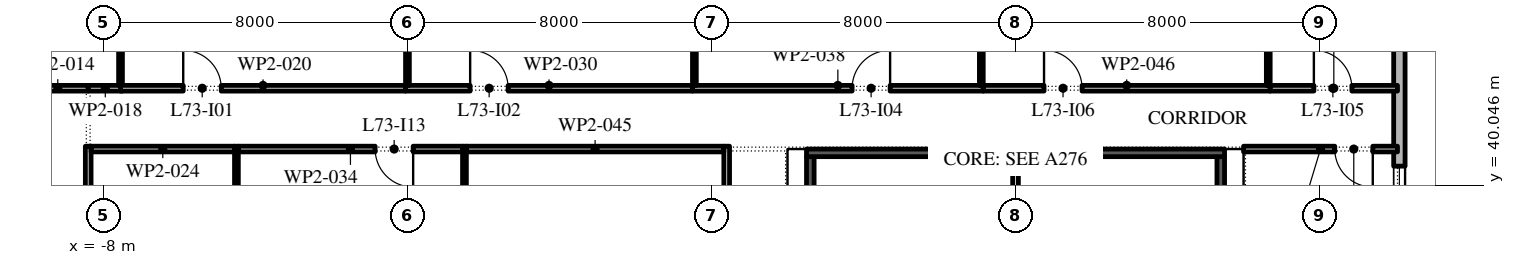
"""IFC4 building model, lengths in metres.
Left out: names, types, materials, properties, quantities, classifications, styles, units other than length and angle.
Written with IfcOpenShell. Run it as: python <this file> out.ifc"""

import sys

from ifc_helpers import new_model, si_unit, direction, frame, frame_2d, origin, place, context, subcontext, project, spatial, rectangle, extrude, element, fill, save


model = new_model("IFC4")
c1 = context("Model", 3, precision=1e-05, world=origin(), true_north=direction((0.0, 1.0)))
c2 = subcontext(c1, "Body", "Model", "MODEL_VIEW")
j1 = project(units=[si_unit("LENGTHUNIT", "METRE"), si_unit("PLANEANGLEUNIT", "RADIAN")], contexts=[c1])
p1 = place(None, origin())
s1 = spatial("IfcSite", under=j1, at=p1, CompositionType="ELEMENT")
p2 = place(p1, origin())
s2 = spatial("IfcBuilding", under=s1, at=p2, CompositionType="ELEMENT")
p3 = place(p2, frame((0.0, 0.0, 334.2)))
s3 = spatial("IfcBuildingStorey", under=s2, at=p3, CompositionType="ELEMENT", Elevation=334.2)
p4 = place(p3, frame((26.1, -2.1, 0.0), z_axis=(0.0, 0.0, 1.0), x_axis=(0.0, 1.0, 0.0)))
e1 = element("IfcWall", 1, at=p4, inside=s3, PredefinedType="STANDARD", context=c2, shape_type="SweptSolid", body=[
    extrude(rectangle(XDim=51.5, YDim=0.3, at=frame_2d((25.75, 0.0))), origin(), (0.0, 0.0, 1.0), 4.0),
])
p5 = place(p4, frame((1.3, 0.0, 0.45)))
e2 = element("IfcOpeningElement", 2, at=p5, cuts=e1, PredefinedType="OPENING", context=c2, shape_type="SweptSolid", body=[
    extrude(rectangle(XDim=4.5, YDim=3.05, at=frame_2d((2.25, 1.525))), frame((0.0, 0.16, 0.0), z_axis=(0.0, -1.0, 0.0), x_axis=(1.0, 0.0, 0.0)), (0.0, 0.0, 1.0), 0.32),
])
p6 = place(p4, frame((8.55, 0.0, 0.45)))
e3 = element("IfcOpeningElement", 3, at=p6, cuts=e1, PredefinedType="OPENING", context=c2, shape_type="SweptSolid", body=[
    extrude(rectangle(XDim=4.5, YDim=3.05, at=frame_2d((2.25, 1.525))), frame((0.0, 0.16, 0.0), z_axis=(0.0, -1.0, 0.0), x_axis=(1.0, 0.0, 0.0)), (0.0, 0.0, 1.0), 0.32),
])
p7 = place(p4, frame((17.0, 0.0, 0.0)))
e4 = element("IfcOpeningElement", 4, at=p7, cuts=e1, PredefinedType="OPENING", context=c2, shape_type="SweptSolid", body=[
    extrude(rectangle(XDim=2.4, YDim=3.5, at=frame_2d((1.2, 1.75))), frame((0.0, 0.16, 0.0), z_axis=(0.0, -1.0, 0.0), x_axis=(1.0, 0.0, 0.0)), (0.0, 0.0, 1.0), 0.32),
])
p8 = place(p4, frame((23.35, 0.0, 0.45)))
e5 = element("IfcOpeningElement", 5, at=p8, cuts=e1, PredefinedType="OPENING", context=c2, shape_type="SweptSolid", body=[
    extrude(rectangle(XDim=4.5, YDim=3.05, at=frame_2d((2.25, 1.525))), frame((0.0, 0.16, 0.0), z_axis=(0.0, -1.0, 0.0), x_axis=(1.0, 0.0, 0.0)), (0.0, 0.0, 1.0), 0.32),
])
p9 = place(p4, frame((30.75, 0.0, 0.45)))
e6 = element("IfcOpeningElement", 6, at=p9, cuts=e1, PredefinedType="OPENING", context=c2, shape_type="SweptSolid", body=[
    extrude(rectangle(XDim=4.5, YDim=3.05, at=frame_2d((2.25, 1.525))), frame((0.0, 0.16, 0.0), z_axis=(0.0, -1.0, 0.0), x_axis=(1.0, 0.0, 0.0)), (0.0, 0.0, 1.0), 0.32),
])
p10 = place(p4, frame((38.15, 0.0, 0.45)))
e7 = element("IfcOpeningElement", 7, at=p10, cuts=e1, PredefinedType="OPENING", context=c2, shape_type="SweptSolid", body=[
    extrude(rectangle(XDim=4.5, YDim=3.05, at=frame_2d((2.25, 1.525))), frame((0.0, 0.16, 0.0), z_axis=(0.0, -1.0, 0.0), x_axis=(1.0, 0.0, 0.0)), (0.0, 0.0, 1.0), 0.32),
])
p11 = place(p4, frame((46.6, 0.0, 0.0)))
e8 = element("IfcOpeningElement", 8, at=p11, cuts=e1, PredefinedType="OPENING", context=c2, shape_type="SweptSolid", body=[
    extrude(rectangle(XDim=2.4, YDim=3.5, at=frame_2d((1.2, 1.75))), frame((0.0, 0.16, 0.0), z_axis=(0.0, -1.0, 0.0), x_axis=(1.0, 0.0, 0.0)), (0.0, 0.0, 1.0), 0.32),
])
p12 = place(p3, frame((21.4, 25.75, 0.0), z_axis=(0.0, 0.0, 1.0), x_axis=(0.0, 1.0, 0.0)))
e9 = element("IfcWall", 9, at=p12, inside=s3, PredefinedType="SHEAR", context=c2, shape_type="SweptSolid", body=[
    extrude(rectangle(XDim=15.05, YDim=0.2, at=frame_2d((7.525, 0.0))), origin(), (0.0, 0.0, 1.0), 4.0),
])
p13 = place(p12, frame((7.075, 0.0, 0.0)))
e10 = element("IfcOpeningElement", 10, at=p13, cuts=e9, PredefinedType="OPENING", context=c2, shape_type="SweptSolid", body=[
    extrude(rectangle(XDim=0.9, YDim=2.1, at=frame_2d((0.45, 1.05))), frame((0.0, 0.11, 0.0), z_axis=(0.0, -1.0, 0.0), x_axis=(1.0, 0.0, 0.0)), (0.0, 0.0, 1.0), 0.22),
])
p14 = place(p3, frame((10.6, 25.75, 0.0), z_axis=(0.0, 0.0, 1.0), x_axis=(0.0, 1.0, 0.0)))
e11 = element("IfcWall", 11, at=p14, inside=s3, PredefinedType="SHEAR", context=c2, shape_type="SweptSolid", body=[
    extrude(rectangle(XDim=15.05, YDim=0.2, at=frame_2d((7.525, 0.0))), origin(), (0.0, 0.0, 1.0), 4.0),
])
p15 = place(p14, frame((7.075, 0.0, 0.0)))
e12 = element("IfcOpeningElement", 12, at=p15, cuts=e11, PredefinedType="OPENING", context=c2, shape_type="SweptSolid", body=[
    extrude(rectangle(XDim=0.9, YDim=2.1, at=frame_2d((0.45, 1.05))), frame((0.0, 0.11, 0.0), z_axis=(0.0, -1.0, 0.0), x_axis=(1.0, 0.0, 0.0)), (0.0, 0.0, 1.0), 0.22),
])
p16 = place(p3, frame((10.5, 40.9, 0.0), z_axis=(0.0, 0.0, 1.0), x_axis=(1.0, 0.0, 0.0)))
e13 = element("IfcWall", 13, at=p16, inside=s3, PredefinedType="SHEAR", context=c2, shape_type="SweptSolid", body=[
    extrude(rectangle(XDim=11.0, YDim=0.2, at=frame_2d((5.5, 0.0))), origin(), (0.0, 0.0, 1.0), 4.0),
])
p17 = place(p3, frame((16.0, 25.75, 0.0), z_axis=(0.0, 0.0, 1.0), x_axis=(0.0, 1.0, 0.0)))
e14 = element("IfcWall", 14, at=p17, inside=s3, PredefinedType="PARTITIONING", context=c2, shape_type="SweptSolid", body=[
    extrude(rectangle(XDim=15.05, YDim=0.15, at=frame_2d((7.525, 0.0))), origin(), (0.0, 0.0, 1.0), 4.0),
])
p18 = place(p3, frame((-10.0, 42.6, 0.0), z_axis=(0.0, 0.0, 1.0), x_axis=(1.0, 0.0, 0.0)))
e15 = element("IfcWall", 15, at=p18, inside=s3, PredefinedType="PARTITIONING", context=c2, shape_type="SweptSolid", body=[
    extrude(rectangle(XDim=1.6, YDim=0.15, at=frame_2d((0.8, 0.0))), origin(), (0.0, 0.0, 1.0), 4.0),
])
p19 = place(p3, frame((-8.4, 41.075, 0.0), z_axis=(0.0, 0.0, 1.0), x_axis=(0.0, -1.0, 0.0)))
e16 = element("IfcWall", 16, at=p19, inside=s3, PredefinedType="PARTITIONING", context=c2, shape_type="SweptSolid", body=[
    extrude(rectangle(XDim=9.025, YDim=0.15, at=frame_2d((4.512, 0.0))), origin(), (0.0, 0.0, 1.0), 4.0),
])
p20 = place(p19, frame((2.175, 0.0, 0.0)))
e17 = element("IfcOpeningElement", 17, at=p20, cuts=e16, PredefinedType="OPENING", context=c2, shape_type="SweptSolid", body=[
    extrude(rectangle(XDim=1.0, YDim=2.1, at=frame_2d((0.5, 1.05))), frame((0.0, 0.085, 0.0), z_axis=(0.0, -1.0, 0.0), x_axis=(1.0, 0.0, 0.0)), (0.0, 0.0, 1.0), 0.17),
])
p21 = place(p3, frame((-8.4, 42.6, 0.0), z_axis=(0.0, 0.0, 1.0), x_axis=(1.0, 0.0, 0.0)))
e18 = element("IfcWall", 18, at=p21, inside=s3, PredefinedType="PARTITIONING", context=c2, shape_type="SweptSolid", body=[
    extrude(rectangle(XDim=0.9, YDim=0.15, at=frame_2d((0.45, 0.0))), origin(), (0.0, 0.0, 1.0), 4.0),
])
p22 = place(p3, frame((-7.55, 42.675, 0.0), z_axis=(0.0, 0.0, 1.0), x_axis=(0.0, 1.0, 0.0)))
e19 = element("IfcWall", 19, at=p22, inside=s3, PredefinedType="PARTITIONING", context=c2, shape_type="SweptSolid", body=[
    extrude(rectangle(XDim=4.775, YDim=0.1, at=frame_2d((2.387, 0.0))), origin(), (0.0, 0.0, 1.0), 3.164),
])
p23 = place(p3, frame((-7.55, 42.6, 0.0), z_axis=(0.0, 0.0, 1.0), x_axis=(1.0, 0.0, 0.0)))
e20 = element("IfcWall", 20, at=p23, inside=s3, PredefinedType="PARTITIONING", context=c2, shape_type="SweptSolid", body=[
    extrude(rectangle(XDim=7.5, YDim=0.15, at=frame_2d((3.75, 0.0))), origin(), (0.0, 0.0, 1.0), 4.0),
])
p24 = place(p23, frame((1.65, 0.0, 0.0)))
e21 = element("IfcOpeningElement", 21, at=p24, cuts=e20, PredefinedType="OPENING", context=c2, shape_type="SweptSolid", body=[
    extrude(rectangle(XDim=1.0, YDim=2.1, at=frame_2d((0.5, 1.05))), frame((0.0, 0.085, 0.0), z_axis=(0.0, -1.0, 0.0), x_axis=(1.0, 0.0, 0.0)), (0.0, 0.0, 1.0), 0.17),
])
p25 = place(p3, frame((-4.5, 32.05, 0.0), z_axis=(0.0, 0.0, 1.0), x_axis=(0.0, 1.0, 0.0)))
e22 = element("IfcWall", 22, at=p25, inside=s3, PredefinedType="PARTITIONING", context=c2, shape_type="SweptSolid", body=[
    extrude(rectangle(XDim=9.025, YDim=0.1, at=frame_2d((4.512, 0.0))), origin(), (0.0, 0.0, 1.0), 4.0),
])
p26 = place(p3, frame((-4.55, 41.0, 0.0), z_axis=(0.0, 0.0, 1.0), x_axis=(-1.0, 0.0, 0.0)))
e23 = element("IfcWall", 23, at=p26, inside=s3, PredefinedType="PARTITIONING", context=c2, shape_type="SweptSolid", body=[
    extrude(rectangle(XDim=3.775, YDim=0.15, at=frame_2d((1.887, 0.0))), origin(), (0.0, 0.0, 1.0), 4.0),
])
p27 = place(p3, frame((-0.05, 42.6, 0.0), z_axis=(0.0, 0.0, 1.0), x_axis=(1.0, 0.0, 0.0)))
e24 = element("IfcWall", 24, at=p27, inside=s3, PredefinedType="PARTITIONING", context=c2, shape_type="SweptSolid", body=[
    extrude(rectangle(XDim=7.55, YDim=0.15, at=frame_2d((3.775, 0.0))), origin(), (0.0, 0.0, 1.0), 4.0),
])
p28 = place(p27, frame((1.7, 0.0, 0.0)))
e25 = element("IfcOpeningElement", 25, at=p28, cuts=e24, PredefinedType="OPENING", context=c2, shape_type="SweptSolid", body=[
    extrude(rectangle(XDim=1.0, YDim=2.1, at=frame_2d((0.5, 1.05))), frame((0.0, 0.085, 0.0), z_axis=(0.0, -1.0, 0.0), x_axis=(1.0, 0.0, 0.0)), (0.0, 0.0, 1.0), 0.17),
])
p29 = place(p3, frame((0.0, 52.8, 0.0), z_axis=(0.0, 0.0, 1.0), x_axis=(0.0, -1.0, 0.0)))
e26 = element("IfcWall", 26, at=p29, inside=s3, PredefinedType="PARTITIONING", context=c2, shape_type="SweptSolid", body=[
    extrude(rectangle(XDim=10.125, YDim=0.1, at=frame_2d((5.062, 0.0))), origin(), (0.0, 0.0, 1.0), 4.0),
])
p30 = place(p3, frame((1.5, 32.05, 0.0), z_axis=(0.0, 0.0, 1.0), x_axis=(0.0, 1.0, 0.0)))
e27 = element("IfcWall", 27, at=p30, inside=s3, PredefinedType="PARTITIONING", context=c2, shape_type="SweptSolid", body=[
    extrude(rectangle(XDim=9.025, YDim=0.1, at=frame_2d((4.512, 0.0))), origin(), (0.0, 0.0, 1.0), 4.0),
])
p31 = place(p3, frame((1.45, 41.0, 0.0), z_axis=(0.0, 0.0, 1.0), x_axis=(-1.0, 0.0, 0.0)))
e28 = element("IfcWall", 28, at=p31, inside=s3, PredefinedType="PARTITIONING", context=c2, shape_type="SweptSolid", body=[
    extrude(rectangle(XDim=5.9, YDim=0.15, at=frame_2d((2.95, 0.0))), origin(), (0.0, 0.0, 1.0), 4.0),
])
p32 = place(p31, frame((1.3, 0.0, 0.0)))
e29 = element("IfcOpeningElement", 29, at=p32, cuts=e28, PredefinedType="OPENING", context=c2, shape_type="SweptSolid", body=[
    extrude(rectangle(XDim=1.0, YDim=2.1, at=frame_2d((0.5, 1.05))), frame((0.0, 0.085, 0.0), z_axis=(0.0, -1.0, 0.0), x_axis=(1.0, 0.0, 0.0)), (0.0, 0.0, 1.0), 0.17),
])
p33 = place(p3, frame((7.5, 42.6, 0.0), z_axis=(0.0, 0.0, 1.0), x_axis=(1.0, 0.0, 0.0)))
e30 = element("IfcWall", 30, at=p33, inside=s3, PredefinedType="PARTITIONING", context=c2, shape_type="SweptSolid", body=[
    extrude(rectangle(XDim=7.65, YDim=0.15, at=frame_2d((3.825, 0.0))), origin(), (0.0, 0.0, 1.0), 4.0),
])
p34 = place(p33, frame((4.2, 0.0, 0.0)))
e31 = element("IfcOpeningElement", 31, at=p34, cuts=e30, PredefinedType="OPENING", context=c2, shape_type="SweptSolid", body=[
    extrude(rectangle(XDim=1.0, YDim=2.1, at=frame_2d((0.5, 1.05))), frame((0.0, 0.085, 0.0), z_axis=(0.0, -1.0, 0.0), x_axis=(1.0, 0.0, 0.0)), (0.0, 0.0, 1.0), 0.17),
])
p35 = place(p3, frame((7.55, 45.95, 0.0), z_axis=(0.0, 0.0, 1.0), x_axis=(0.0, -1.0, 0.0)))
e32 = element("IfcWall", 32, at=p35, inside=s3, PredefinedType="PARTITIONING", context=c2, shape_type="SweptSolid", body=[
    extrude(rectangle(XDim=3.275, YDim=0.1, at=frame_2d((1.637, 0.0))), origin(), (0.0, 0.0, 1.0), 3.164),
])
p36 = place(p3, frame((8.4, 32.0, 0.0), z_axis=(0.0, 0.0, 1.0), x_axis=(0.0, 1.0, 0.0)))
e33 = element("IfcWall", 33, at=p36, inside=s3, PredefinedType="PARTITIONING", context=c2, shape_type="SweptSolid", body=[
    extrude(rectangle(XDim=9.075, YDim=0.15, at=frame_2d((4.538, 0.0))), origin(), (0.0, 0.0, 1.0), 4.0),
])
p37 = place(p36, frame((3.1, 0.0, 0.0)))
e34 = element("IfcOpeningElement", 34, at=p37, cuts=e33, PredefinedType="OPENING", context=c2, shape_type="SweptSolid", body=[
    extrude(rectangle(XDim=1.0, YDim=2.1, at=frame_2d((0.5, 1.05))), frame((0.0, 0.085, 0.0), z_axis=(0.0, -1.0, 0.0), x_axis=(1.0, 0.0, 0.0)), (0.0, 0.0, 1.0), 0.17),
])
p38 = place(p3, frame((8.325, 41.0, 0.0), z_axis=(0.0, 0.0, 1.0), x_axis=(-1.0, 0.0, 0.0)))
e35 = element("IfcWall", 35, at=p38, inside=s3, PredefinedType="PARTITIONING", context=c2, shape_type="SweptSolid", body=[
    extrude(rectangle(XDim=6.775, YDim=0.15, at=frame_2d((3.387, 0.0))), origin(), (0.0, 0.0, 1.0), 4.0),
])
p39 = place(p3, frame((15.15, 42.6, 0.0), z_axis=(0.0, 0.0, 1.0), x_axis=(1.0, 0.0, 0.0)))
e36 = element("IfcWall", 36, at=p39, inside=s3, PredefinedType="PARTITIONING", context=c2, shape_type="SweptSolid", body=[
    extrude(rectangle(XDim=7.55, YDim=0.15, at=frame_2d((3.775, 0.0))), origin(), (0.0, 0.0, 1.0), 4.0),
])
p40 = place(p39, frame((1.6, 0.0, 0.0)))
e37 = element("IfcOpeningElement", 37, at=p40, cuts=e36, PredefinedType="OPENING", context=c2, shape_type="SweptSolid", body=[
    extrude(rectangle(XDim=1.0, YDim=2.1, at=frame_2d((0.5, 1.05))), frame((0.0, 0.085, 0.0), z_axis=(0.0, -1.0, 0.0), x_axis=(1.0, 0.0, 0.0)), (0.0, 0.0, 1.0), 0.17),
])
p41 = place(p3, frame((15.1, 45.95, 0.0), z_axis=(0.0, 0.0, 1.0), x_axis=(0.0, -1.0, 0.0)))
e38 = element("IfcWall", 38, at=p41, inside=s3, PredefinedType="PARTITIONING", context=c2, shape_type="SweptSolid", body=[
    extrude(rectangle(XDim=3.275, YDim=0.1, at=frame_2d((1.637, 0.0))), origin(), (0.0, 0.0, 1.0), 4.0),
])
p42 = place(p3, frame((22.65, 42.675, 0.0), z_axis=(0.0, 0.0, 1.0), x_axis=(0.0, 1.0, 0.0)))
e39 = element("IfcWall", 39, at=p42, inside=s3, PredefinedType="PARTITIONING", context=c2, shape_type="SweptSolid", body=[
    extrude(rectangle(XDim=6.735, YDim=0.1, at=frame_2d((3.367, 0.0))), origin(), (0.0, 0.0, 1.0), 4.0),
])
p43 = place(p3, frame((22.7, 42.6, 0.0), z_axis=(0.0, 0.0, 1.0), x_axis=(1.0, 0.0, 0.0)))
e40 = element("IfcWall", 40, at=p43, inside=s3, PredefinedType="PARTITIONING", context=c2, shape_type="SweptSolid", body=[
    extrude(rectangle(XDim=3.35, YDim=0.15, at=frame_2d((1.675, 0.0))), origin(), (0.0, 0.0, 1.0), 4.0),
])
p44 = place(p43, frame((1.15, 0.0, 0.0)))
e41 = element("IfcOpeningElement", 41, at=p44, cuts=e40, PredefinedType="OPENING", context=c2, shape_type="SweptSolid", body=[
    extrude(rectangle(XDim=1.0, YDim=2.1, at=frame_2d((0.5, 1.05))), frame((0.0, 0.085, 0.0), z_axis=(0.0, -1.0, 0.0), x_axis=(1.0, 0.0, 0.0)), (0.0, 0.0, 1.0), 0.17),
])
p45 = place(p3, frame((26.05, 41.0, 0.0), z_axis=(0.0, 0.0, 1.0), x_axis=(-1.0, 0.0, 0.0)))
e42 = element("IfcWall", 42, at=p45, inside=s3, PredefinedType="PARTITIONING", context=c2, shape_type="SweptSolid", body=[
    extrude(rectangle(XDim=4.05, YDim=0.15, at=frame_2d((2.025, 0.0))), origin(), (0.0, 0.0, 1.0), 4.0),
])
p46 = place(p45, frame((0.65, 0.0, 0.0)))
e43 = element("IfcOpeningElement", 43, at=p46, cuts=e42, PredefinedType="OPENING", context=c2, shape_type="SweptSolid", body=[
    extrude(rectangle(XDim=1.0, YDim=2.1, at=frame_2d((0.5, 1.05))), frame((0.0, 0.085, 0.0), z_axis=(0.0, -1.0, 0.0), x_axis=(1.0, 0.0, 0.0)), (0.0, 0.0, 1.0), 0.17),
])
p47 = place(p10, origin())
e44 = element("IfcWindow", 44, at=p47, inside=s3, PartitioningType="DOUBLE_PANEL_VERTICAL", PredefinedType="WINDOW", context=c2, shape_type="SweptSolid", body=[
    extrude(rectangle(XDim=4.5, YDim=3.05, at=frame_2d((2.25, 1.525))), frame((0.0, 0.03, 0.0), z_axis=(0.0, -1.0, 0.0), x_axis=(1.0, 0.0, 0.0)), (0.0, 0.0, 1.0), 0.06),
])
fill(e7, e44)
p48 = place(p24, origin())
e45 = element("IfcDoor", 45, at=p48, inside=s3, OperationType="SINGLE_SWING_RIGHT", PredefinedType="DOOR", context=c2, shape_type="SweptSolid", body=[
    extrude(rectangle(XDim=1.0, YDim=2.1, at=frame_2d((0.5, 1.05))), frame((0.0, 0.025, 0.0), z_axis=(0.0, -1.0, 0.0), x_axis=(1.0, 0.0, 0.0)), (0.0, 0.0, 1.0), 0.05),
])
fill(e21, e45)
p49 = place(p28, origin())
e46 = element("IfcDoor", 46, at=p49, inside=s3, OperationType="SINGLE_SWING_RIGHT", PredefinedType="DOOR", context=c2, shape_type="SweptSolid", body=[
    extrude(rectangle(XDim=1.0, YDim=2.1, at=frame_2d((0.5, 1.05))), frame((0.0, 0.025, 0.0), z_axis=(0.0, -1.0, 0.0), x_axis=(1.0, 0.0, 0.0)), (0.0, 0.0, 1.0), 0.05),
])
fill(e25, e46)
p50 = place(p34, origin())
e47 = element("IfcDoor", 47, at=p50, inside=s3, OperationType="SINGLE_SWING_LEFT", PredefinedType="DOOR", context=c2, shape_type="SweptSolid", body=[
    extrude(rectangle(XDim=1.0, YDim=2.1, at=frame_2d((0.5, 1.05))), frame((0.0, 0.025, 0.0), z_axis=(0.0, -1.0, 0.0), x_axis=(1.0, 0.0, 0.0)), (0.0, 0.0, 1.0), 0.05),
])
fill(e31, e47)
p51 = place(p44, origin())
e48 = element("IfcDoor", 48, at=p51, inside=s3, OperationType="SINGLE_SWING_RIGHT", PredefinedType="DOOR", context=c2, shape_type="SweptSolid", body=[
    extrude(rectangle(XDim=1.0, YDim=2.1, at=frame_2d((0.5, 1.05))), frame((0.0, 0.025, 0.0), z_axis=(0.0, -1.0, 0.0), x_axis=(1.0, 0.0, 0.0)), (0.0, 0.0, 1.0), 0.05),
])
fill(e41, e48)
p52 = place(p40, origin())
e49 = element("IfcDoor", 49, at=p52, inside=s3, OperationType="SINGLE_SWING_RIGHT", PredefinedType="DOOR", context=c2, shape_type="SweptSolid", body=[
    extrude(rectangle(XDim=1.0, YDim=2.1, at=frame_2d((0.5, 1.05))), frame((0.0, 0.025, 0.0), z_axis=(0.0, -1.0, 0.0), x_axis=(1.0, 0.0, 0.0)), (0.0, 0.0, 1.0), 0.05),
])
fill(e37, e49)
p53 = place(p32, origin())
e50 = element("IfcDoor", 50, at=p53, inside=s3, OperationType="SINGLE_SWING_RIGHT", PredefinedType="DOOR", context=c2, shape_type="SweptSolid", body=[
    extrude(rectangle(XDim=1.0, YDim=2.1, at=frame_2d((0.5, 1.05))), frame((0.0, 0.025, 0.0), z_axis=(0.0, -1.0, 0.0), x_axis=(1.0, 0.0, 0.0)), (0.0, 0.0, 1.0), 0.05),
])
fill(e29, e50)
p54 = place(p46, origin())
e51 = element("IfcDoor", 51, at=p54, inside=s3, OperationType="SINGLE_SWING_RIGHT", PredefinedType="DOOR", context=c2, shape_type="SweptSolid", body=[
    extrude(rectangle(XDim=1.0, YDim=2.1, at=frame_2d((0.5, 1.05))), frame((0.0, 0.025, 0.0), z_axis=(0.0, -1.0, 0.0), x_axis=(1.0, 0.0, 0.0)), (0.0, 0.0, 1.0), 0.05),
])
fill(e43, e51)
save(model, sys.argv[1])
